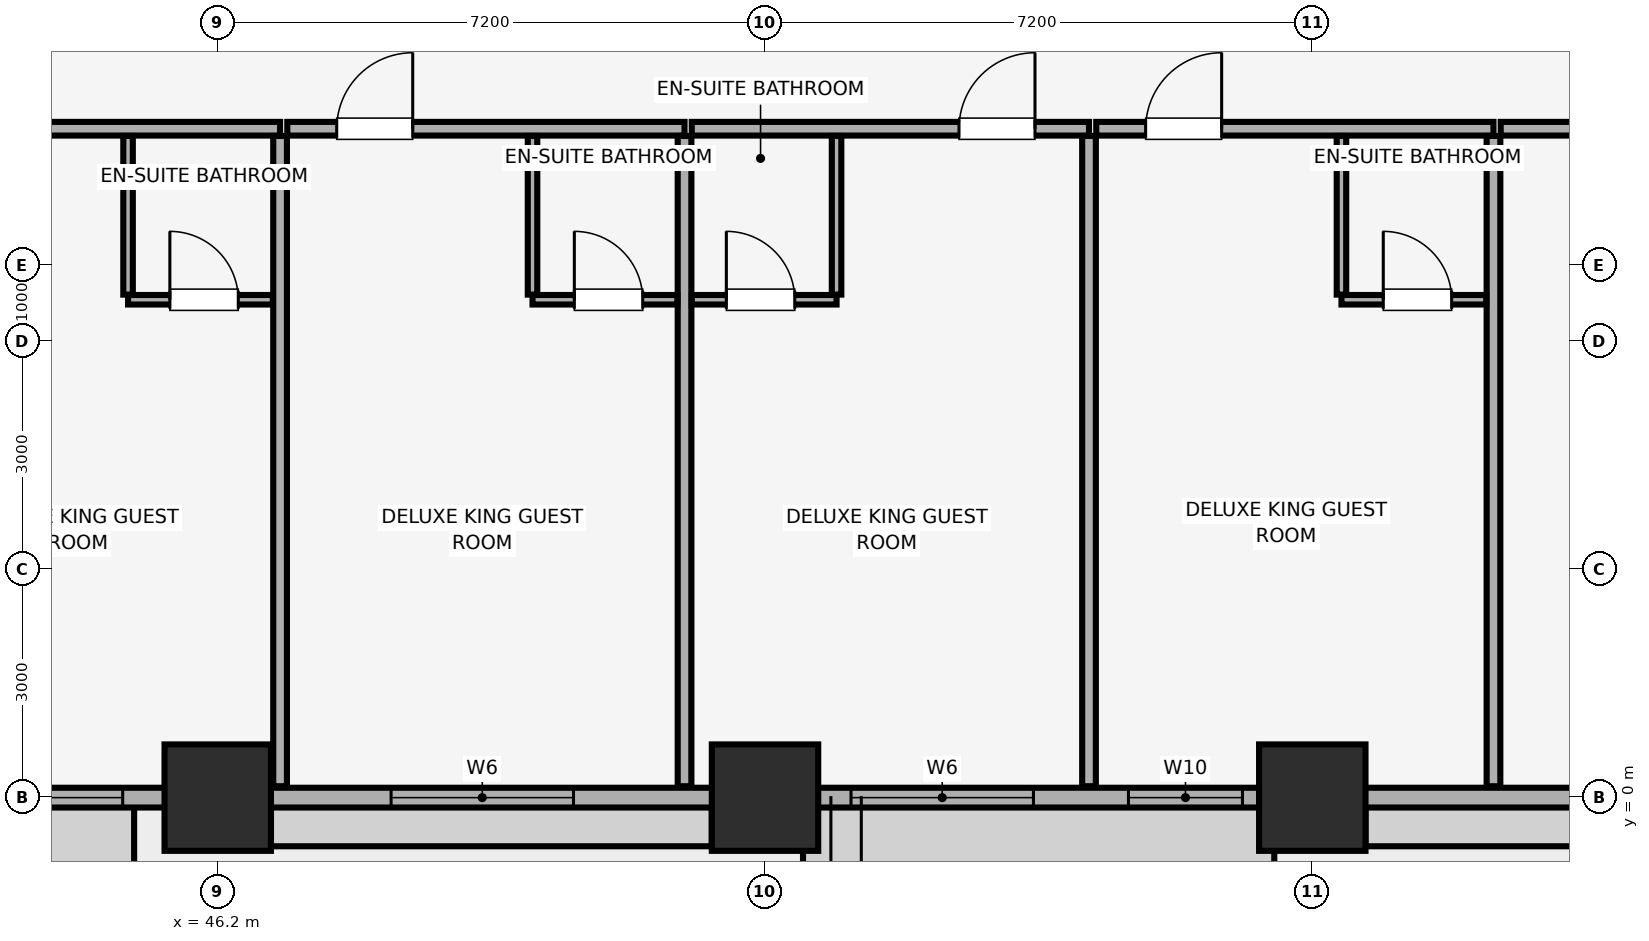
"""IFC4 building model, lengths in metres.
Left out: names, types, materials, properties, quantities, classifications, styles, units other than length and angle.
Written with IfcOpenShell. Run it as: python <this file> out.ifc"""

import sys

from ifc_helpers import new_model, si_unit, direction, frame, frame_2d, origin, origin_2d, place, context, subcontext, project, spatial, rectangle, extrude, element, fill, save


model = new_model("IFC4")
c1 = context("Model", 3, precision=1e-05, world=origin(), true_north=direction((0.0, 1.0)))
c2 = subcontext(c1, "Body", "Model", "MODEL_VIEW")
j1 = project(units=[si_unit("LENGTHUNIT", "METRE"), si_unit("PLANEANGLEUNIT", "RADIAN")], contexts=[c1])
p1 = place(None, origin())
s1 = spatial("IfcSite", under=j1, at=p1, CompositionType="ELEMENT")
p2 = place(p1, origin())
s2 = spatial("IfcBuilding", under=s1, at=p2, CompositionType="ELEMENT")
p3 = place(p2, frame((0.0, 0.0, 35.15)))
s3 = spatial("IfcBuildingStorey", under=s2, at=p3, CompositionType="ELEMENT", Elevation=35.15)
for number, where, z_axis, x_axis in (
    (1, (46.2, 0.0, 0.0), (0.0, 0.0, 1.0), (1.0, 0.0, 0.0)),
    (2, (53.4, 0.0, 0.0), (0.0, 0.0, 1.0), (1.0, 0.0, 0.0)),
    (3, (60.6, 0.0, 0.0), (0.0, 0.0, 1.0), (1.0, 0.0, 0.0)),
):
    element("IfcColumn", number, at=place(p3, frame(where, z_axis=z_axis, x_axis=x_axis)), inside=s3, PredefinedType="COLUMN", context=c2, shape_type="SweptSolid", body=[
        extrude(rectangle(XDim=1.4, YDim=1.4, at=origin_2d()), origin(), (0.0, 0.0, 1.0), 3.51),
    ])
p4 = place(p3, frame((4.2, 0.0, 0.0), z_axis=(0.0, 0.0, 1.0), x_axis=(1.0, 0.0, 0.0)))
e4 = element("IfcWall", 4, at=p4, inside=s3, PredefinedType="SOLIDWALL", context=c2, shape_type="SweptSolid", body=[
    extrude(rectangle(XDim=75.6, YDim=0.26, at=frame_2d((37.8, 0.0))), origin(), (0.0, 0.0, 1.0), 2.56),
])
p5 = place(p4, frame((13.517, 0.0, 0.0)))
e5 = element("IfcOpeningElement", 5, at=p5, cuts=e4, PredefinedType="OPENING", context=c2, shape_type="SweptSolid", body=[
    extrude(rectangle(XDim=1.1, YDim=2.15, at=frame_2d((0.55, 1.075))), frame((0.0, 0.14, 0.0), z_axis=(0.0, -1.0, 0.0), x_axis=(1.0, 0.0, 0.0)), (0.0, 0.0, 1.0), 0.28),
])
p6 = place(p4, frame((28.183, 0.0, 0.0)))
e6 = element("IfcOpeningElement", 6, at=p6, cuts=e4, PredefinedType="OPENING", context=c2, shape_type="SweptSolid", body=[
    extrude(rectangle(XDim=1.1, YDim=2.15, at=frame_2d((0.55, 1.075))), frame((0.0, 0.14, 0.0), z_axis=(0.0, -1.0, 0.0), x_axis=(1.0, 0.0, 0.0)), (0.0, 0.0, 1.0), 0.28),
])
p7 = place(p4, frame((60.983, 0.0, 0.0)))
e7 = element("IfcOpeningElement", 7, at=p7, cuts=e4, PredefinedType="OPENING", context=c2, shape_type="SweptSolid", body=[
    extrude(rectangle(XDim=1.1, YDim=2.15, at=frame_2d((0.55, 1.075))), frame((0.0, 0.14, 0.0), z_axis=(0.0, -1.0, 0.0), x_axis=(1.0, 0.0, 0.0)), (0.0, 0.0, 1.0), 0.28),
])
p8 = place(p4, frame((1.035, 0.0, 0.85)))
e8 = element("IfcOpeningElement", 8, at=p8, cuts=e4, PredefinedType="OPENING", context=c2, shape_type="SweptSolid", body=[
    extrude(rectangle(XDim=2.4, YDim=1.5, at=frame_2d((1.2, 0.75))), frame((0.0, 0.14, 0.0), z_axis=(0.0, -1.0, 0.0), x_axis=(1.0, 0.0, 0.0)), (0.0, 0.0, 1.0), 0.28),
])
p9 = place(p4, frame((7.031, 0.0, 0.85)))
e9 = element("IfcOpeningElement", 9, at=p9, cuts=e4, PredefinedType="OPENING", context=c2, shape_type="SweptSolid", body=[
    extrude(rectangle(XDim=2.4, YDim=1.5, at=frame_2d((1.2, 0.75))), frame((0.0, 0.14, 0.0), z_axis=(0.0, -1.0, 0.0), x_axis=(1.0, 0.0, 0.0)), (0.0, 0.0, 1.0), 0.28),
])
p10 = place(p4, frame((16.757, 0.0, 0.85)))
e10 = element("IfcOpeningElement", 10, at=p10, cuts=e4, PredefinedType="OPENING", context=c2, shape_type="SweptSolid", body=[
    extrude(rectangle(XDim=1.5, YDim=1.4, at=frame_2d((0.75, 0.7))), frame((0.0, 0.14, 0.0), z_axis=(0.0, -1.0, 0.0), x_axis=(1.0, 0.0, 0.0)), (0.0, 0.0, 1.0), 0.28),
])
p11 = place(p4, frame((22.567, 0.0, 0.85)))
e11 = element("IfcOpeningElement", 11, at=p11, cuts=e4, PredefinedType="OPENING", context=c2, shape_type="SweptSolid", body=[
    extrude(rectangle(XDim=2.4, YDim=1.5, at=frame_2d((1.2, 0.75))), frame((0.0, 0.14, 0.0), z_axis=(0.0, -1.0, 0.0), x_axis=(1.0, 0.0, 0.0)), (0.0, 0.0, 1.0), 0.28),
])
p12 = place(p4, frame((30.065, 0.0, 0.85)))
e12 = element("IfcOpeningElement", 12, at=p12, cuts=e4, PredefinedType="OPENING", context=c2, shape_type="SweptSolid", body=[
    extrude(rectangle(XDim=1.5, YDim=1.4, at=frame_2d((0.75, 0.7))), frame((0.0, 0.14, 0.0), z_axis=(0.0, -1.0, 0.0), x_axis=(1.0, 0.0, 0.0)), (0.0, 0.0, 1.0), 0.28),
])
p13 = place(p4, frame((34.55, 0.0, 0.85)))
e13 = element("IfcOpeningElement", 13, at=p13, cuts=e4, PredefinedType="OPENING", context=c2, shape_type="SweptSolid", body=[
    extrude(rectangle(XDim=2.4, YDim=1.5, at=frame_2d((1.2, 0.75))), frame((0.0, 0.14, 0.0), z_axis=(0.0, -1.0, 0.0), x_axis=(1.0, 0.0, 0.0)), (0.0, 0.0, 1.0), 0.28),
])
p14 = place(p4, frame((38.35, 0.0, 0.85)))
e14 = element("IfcOpeningElement", 14, at=p14, cuts=e4, PredefinedType="OPENING", context=c2, shape_type="SweptSolid", body=[
    extrude(rectangle(XDim=2.4, YDim=1.5, at=frame_2d((1.2, 0.75))), frame((0.0, 0.14, 0.0), z_axis=(0.0, -1.0, 0.0), x_axis=(1.0, 0.0, 0.0)), (0.0, 0.0, 1.0), 0.28),
])
p15 = place(p4, frame((44.281, 0.0, 0.85)))
e15 = element("IfcOpeningElement", 15, at=p15, cuts=e4, PredefinedType="OPENING", context=c2, shape_type="SweptSolid", body=[
    extrude(rectangle(XDim=2.4, YDim=1.5, at=frame_2d((1.2, 0.75))), frame((0.0, 0.14, 0.0), z_axis=(0.0, -1.0, 0.0), x_axis=(1.0, 0.0, 0.0)), (0.0, 0.0, 1.0), 0.28),
])
p16 = place(p4, frame((50.332, 0.0, 0.85)))
e16 = element("IfcOpeningElement", 16, at=p16, cuts=e4, PredefinedType="OPENING", context=c2, shape_type="SweptSolid", body=[
    extrude(rectangle(XDim=2.4, YDim=1.5, at=frame_2d((1.2, 0.75))), frame((0.0, 0.14, 0.0), z_axis=(0.0, -1.0, 0.0), x_axis=(1.0, 0.0, 0.0)), (0.0, 0.0, 1.0), 0.28),
])
p17 = place(p4, frame((53.981, 0.0, 0.85)))
e17 = element("IfcOpeningElement", 17, at=p17, cuts=e4, PredefinedType="OPENING", context=c2, shape_type="SweptSolid", body=[
    extrude(rectangle(XDim=1.5, YDim=1.4, at=frame_2d((0.75, 0.7))), frame((0.0, 0.14, 0.0), z_axis=(0.0, -1.0, 0.0), x_axis=(1.0, 0.0, 0.0)), (0.0, 0.0, 1.0), 0.28),
])
p18 = place(p4, frame((64.759, 0.0, 0.85)))
e18 = element("IfcOpeningElement", 18, at=p18, cuts=e4, PredefinedType="OPENING", context=c2, shape_type="SweptSolid", body=[
    extrude(rectangle(XDim=1.5, YDim=1.4, at=frame_2d((0.75, 0.7))), frame((0.0, 0.14, 0.0), z_axis=(0.0, -1.0, 0.0), x_axis=(1.0, 0.0, 0.0)), (0.0, 0.0, 1.0), 0.28),
])
p19 = place(p4, frame((67.509, 0.0, 0.85)))
e19 = element("IfcOpeningElement", 19, at=p19, cuts=e4, PredefinedType="OPENING", context=c2, shape_type="SweptSolid", body=[
    extrude(rectangle(XDim=2.4, YDim=1.5, at=frame_2d((1.2, 0.75))), frame((0.0, 0.14, 0.0), z_axis=(0.0, -1.0, 0.0), x_axis=(1.0, 0.0, 0.0)), (0.0, 0.0, 1.0), 0.28),
])
p20 = place(p4, frame((72.165, 0.0, 0.85)))
e20 = element("IfcOpeningElement", 20, at=p20, cuts=e4, PredefinedType="OPENING", context=c2, shape_type="SweptSolid", body=[
    extrude(rectangle(XDim=2.4, YDim=1.5, at=frame_2d((1.2, 0.75))), frame((0.0, 0.14, 0.0), z_axis=(0.0, -1.0, 0.0), x_axis=(1.0, 0.0, 0.0)), (0.0, 0.0, 1.0), 0.28),
])
p21 = place(p3, frame((41.794, 8.8, 0.0), z_axis=(0.0, 0.0, 1.0), x_axis=(1.0, 0.0, 0.0)))
e21 = element("IfcWall", 21, at=p21, inside=s3, PredefinedType="PARTITIONING", context=c2, shape_type="SweptSolid", body=[
    extrude(rectangle(XDim=5.226, YDim=0.18, at=frame_2d((2.613, 0.0))), origin(), (0.0, 0.0, 1.0), 3.51),
])
p22 = place(p21, frame((0.65, 0.0, 0.0)))
e22 = element("IfcOpeningElement", 22, at=p22, cuts=e21, PredefinedType="OPENING", context=c2, shape_type="SweptSolid", body=[
    extrude(rectangle(XDim=1.0, YDim=2.15, at=frame_2d((0.5, 1.075))), frame((0.0, 0.1, 0.0), z_axis=(0.0, -1.0, 0.0), x_axis=(1.0, 0.0, 0.0)), (0.0, 0.0, 1.0), 0.2),
])
p23 = place(p3, frame((47.02, 0.15, 0.0), z_axis=(0.0, 0.0, 1.0), x_axis=(0.0, 1.0, 0.0)))
e23 = element("IfcWall", 23, at=p23, inside=s3, PredefinedType="PARTITIONING", context=c2, shape_type="SweptSolid", body=[
    extrude(rectangle(XDim=8.555, YDim=0.18, at=frame_2d((4.278, 0.0))), origin(), (0.0, 0.0, 1.0), 3.51),
])
p24 = place(p3, frame((45.02, 6.55, 0.0), z_axis=(0.0, 0.0, 1.0), x_axis=(1.0, 0.0, 0.0)))
e24 = element("IfcWall", 24, at=p24, inside=s3, PredefinedType="PARTITIONING", context=c2, shape_type="SweptSolid", body=[
    extrude(rectangle(XDim=1.905, YDim=0.125, at=frame_2d((0.953, 0.0))), origin(), (0.0, 0.0, 1.0), 3.51),
])
p25 = place(p24, frame((0.55, 0.0, 0.0)))
e25 = element("IfcOpeningElement", 25, at=p25, cuts=e24, PredefinedType="OPENING", context=c2, shape_type="SweptSolid", body=[
    extrude(rectangle(XDim=0.9, YDim=2.1, at=frame_2d((0.45, 1.05))), frame((0.0, 0.073, 0.0), z_axis=(0.0, -1.0, 0.0), x_axis=(1.0, 0.0, 0.0)), (0.0, 0.0, 1.0), 0.145),
])
p26 = place(p3, frame((45.02, 6.617, 0.0), z_axis=(0.0, 0.0, 1.0), x_axis=(0.0, 1.0, 0.0)))
e26 = element("IfcWall", 26, at=p26, inside=s3, PredefinedType="PARTITIONING", context=c2, shape_type="SweptSolid", body=[
    extrude(rectangle(XDim=2.088, YDim=0.125, at=frame_2d((1.044, 0.0))), origin(), (0.0, 0.0, 1.0), 3.51),
])
p27 = place(p3, frame((47.115, 8.8, 0.0), z_axis=(0.0, 0.0, 1.0), x_axis=(1.0, 0.0, 0.0)))
e27 = element("IfcWall", 27, at=p27, inside=s3, PredefinedType="PARTITIONING", context=c2, shape_type="SweptSolid", body=[
    extrude(rectangle(XDim=5.226, YDim=0.18, at=frame_2d((2.613, 0.0))), origin(), (0.0, 0.0, 1.0), 3.51),
])
p28 = place(p27, frame((0.65, 0.0, 0.0)))
e28 = element("IfcOpeningElement", 28, at=p28, cuts=e27, PredefinedType="OPENING", context=c2, shape_type="SweptSolid", body=[
    extrude(rectangle(XDim=1.0, YDim=2.15, at=frame_2d((0.5, 1.075))), frame((0.0, 0.1, 0.0), z_axis=(0.0, -1.0, 0.0), x_axis=(1.0, 0.0, 0.0)), (0.0, 0.0, 1.0), 0.2),
])
p29 = place(p3, frame((52.341, 0.15, 0.0), z_axis=(0.0, 0.0, 1.0), x_axis=(0.0, 1.0, 0.0)))
e29 = element("IfcWall", 29, at=p29, inside=s3, PredefinedType="PARTITIONING", context=c2, shape_type="SweptSolid", body=[
    extrude(rectangle(XDim=8.555, YDim=0.18, at=frame_2d((4.278, 0.0))), origin(), (0.0, 0.0, 1.0), 3.51),
])
p30 = place(p3, frame((50.341, 6.55, 0.0), z_axis=(0.0, 0.0, 1.0), x_axis=(1.0, 0.0, 0.0)))
e30 = element("IfcWall", 30, at=p30, inside=s3, PredefinedType="PARTITIONING", context=c2, shape_type="SweptSolid", body=[
    extrude(rectangle(XDim=1.905, YDim=0.125, at=frame_2d((0.953, 0.0))), origin(), (0.0, 0.0, 1.0), 3.51),
])
p31 = place(p30, frame((0.55, 0.0, 0.0)))
e31 = element("IfcOpeningElement", 31, at=p31, cuts=e30, PredefinedType="OPENING", context=c2, shape_type="SweptSolid", body=[
    extrude(rectangle(XDim=0.9, YDim=2.1, at=frame_2d((0.45, 1.05))), frame((0.0, 0.073, 0.0), z_axis=(0.0, -1.0, 0.0), x_axis=(1.0, 0.0, 0.0)), (0.0, 0.0, 1.0), 0.145),
])
p32 = place(p3, frame((50.341, 6.617, 0.0), z_axis=(0.0, 0.0, 1.0), x_axis=(0.0, 1.0, 0.0)))
e32 = element("IfcWall", 32, at=p32, inside=s3, PredefinedType="PARTITIONING", context=c2, shape_type="SweptSolid", body=[
    extrude(rectangle(XDim=2.088, YDim=0.125, at=frame_2d((1.044, 0.0))), origin(), (0.0, 0.0, 1.0), 3.51),
])
p33 = place(p3, frame((52.436, 8.8, 0.0), z_axis=(0.0, 0.0, 1.0), x_axis=(1.0, 0.0, 0.0)))
e33 = element("IfcWall", 33, at=p33, inside=s3, PredefinedType="PARTITIONING", context=c2, shape_type="SweptSolid", body=[
    extrude(rectangle(XDim=5.226, YDim=0.18, at=frame_2d((2.613, 0.0))), origin(), (0.0, 0.0, 1.0), 3.51),
])
p34 = place(p33, frame((3.516, 0.0, 0.0)))
e34 = element("IfcOpeningElement", 34, at=p34, cuts=e33, PredefinedType="OPENING", context=c2, shape_type="SweptSolid", body=[
    extrude(rectangle(XDim=1.0, YDim=2.15, at=frame_2d((0.5, 1.075))), frame((0.0, 0.1, 0.0), z_axis=(0.0, -1.0, 0.0), x_axis=(1.0, 0.0, 0.0)), (0.0, 0.0, 1.0), 0.2),
])
p35 = place(p3, frame((57.663, 0.15, 0.0), z_axis=(0.0, 0.0, 1.0), x_axis=(0.0, 1.0, 0.0)))
e35 = element("IfcWall", 35, at=p35, inside=s3, PredefinedType="PARTITIONING", context=c2, shape_type="SweptSolid", body=[
    extrude(rectangle(XDim=8.555, YDim=0.18, at=frame_2d((4.278, 0.0))), origin(), (0.0, 0.0, 1.0), 3.51),
])
p36 = place(p3, frame((52.436, 6.55, 0.0), z_axis=(0.0, 0.0, 1.0), x_axis=(1.0, 0.0, 0.0)))
e36 = element("IfcWall", 36, at=p36, inside=s3, PredefinedType="PARTITIONING", context=c2, shape_type="SweptSolid", body=[
    extrude(rectangle(XDim=1.905, YDim=0.125, at=frame_2d((0.953, 0.0))), origin(), (0.0, 0.0, 1.0), 3.51),
])
p37 = place(p36, frame((0.455, 0.0, 0.0)))
e37 = element("IfcOpeningElement", 37, at=p37, cuts=e36, PredefinedType="OPENING", context=c2, shape_type="SweptSolid", body=[
    extrude(rectangle(XDim=0.9, YDim=2.1, at=frame_2d((0.45, 1.05))), frame((0.0, 0.073, 0.0), z_axis=(0.0, -1.0, 0.0), x_axis=(1.0, 0.0, 0.0)), (0.0, 0.0, 1.0), 0.145),
])
p38 = place(p3, frame((54.341, 6.617, 0.0), z_axis=(0.0, 0.0, 1.0), x_axis=(0.0, 1.0, 0.0)))
e38 = element("IfcWall", 38, at=p38, inside=s3, PredefinedType="PARTITIONING", context=c2, shape_type="SweptSolid", body=[
    extrude(rectangle(XDim=2.088, YDim=0.125, at=frame_2d((1.044, 0.0))), origin(), (0.0, 0.0, 1.0), 3.51),
])
p39 = place(p3, frame((57.758, 8.8, 0.0), z_axis=(0.0, 0.0, 1.0), x_axis=(1.0, 0.0, 0.0)))
e39 = element("IfcWall", 39, at=p39, inside=s3, PredefinedType="PARTITIONING", context=c2, shape_type="SweptSolid", body=[
    extrude(rectangle(XDim=5.226, YDim=0.18, at=frame_2d((2.613, 0.0))), origin(), (0.0, 0.0, 1.0), 3.51),
])
p40 = place(p39, frame((0.65, 0.0, 0.0)))
e40 = element("IfcOpeningElement", 40, at=p40, cuts=e39, PredefinedType="OPENING", context=c2, shape_type="SweptSolid", body=[
    extrude(rectangle(XDim=1.0, YDim=2.15, at=frame_2d((0.5, 1.075))), frame((0.0, 0.1, 0.0), z_axis=(0.0, -1.0, 0.0), x_axis=(1.0, 0.0, 0.0)), (0.0, 0.0, 1.0), 0.2),
])
p41 = place(p3, frame((62.984, 0.15, 0.0), z_axis=(0.0, 0.0, 1.0), x_axis=(0.0, 1.0, 0.0)))
e41 = element("IfcWall", 41, at=p41, inside=s3, PredefinedType="PARTITIONING", context=c2, shape_type="SweptSolid", body=[
    extrude(rectangle(XDim=8.555, YDim=0.18, at=frame_2d((4.278, 0.0))), origin(), (0.0, 0.0, 1.0), 3.51),
])
p42 = place(p3, frame((60.984, 6.55, 0.0), z_axis=(0.0, 0.0, 1.0), x_axis=(1.0, 0.0, 0.0)))
e42 = element("IfcWall", 42, at=p42, inside=s3, PredefinedType="PARTITIONING", context=c2, shape_type="SweptSolid", body=[
    extrude(rectangle(XDim=1.905, YDim=0.125, at=frame_2d((0.953, 0.0))), origin(), (0.0, 0.0, 1.0), 3.51),
])
p43 = place(p42, frame((0.55, 0.0, 0.0)))
e43 = element("IfcOpeningElement", 43, at=p43, cuts=e42, PredefinedType="OPENING", context=c2, shape_type="SweptSolid", body=[
    extrude(rectangle(XDim=0.9, YDim=2.1, at=frame_2d((0.45, 1.05))), frame((0.0, 0.073, 0.0), z_axis=(0.0, -1.0, 0.0), x_axis=(1.0, 0.0, 0.0)), (0.0, 0.0, 1.0), 0.145),
])
p44 = place(p3, frame((60.984, 6.617, 0.0), z_axis=(0.0, 0.0, 1.0), x_axis=(0.0, 1.0, 0.0)))
e44 = element("IfcWall", 44, at=p44, inside=s3, PredefinedType="PARTITIONING", context=c2, shape_type="SweptSolid", body=[
    extrude(rectangle(XDim=2.088, YDim=0.125, at=frame_2d((1.044, 0.0))), origin(), (0.0, 0.0, 1.0), 3.51),
])
p45 = place(p3, frame((63.079, 8.8, 0.0), z_axis=(0.0, 0.0, 1.0), x_axis=(1.0, 0.0, 0.0)))
e45 = element("IfcWall", 45, at=p45, inside=s3, PredefinedType="PARTITIONING", context=c2, shape_type="SweptSolid", body=[
    extrude(rectangle(XDim=8.138, YDim=0.18, at=frame_2d((4.069, 0.0))), origin(), (0.0, 0.0, 1.0), 3.51),
])
p46 = place(p45, frame((1.423, 0.0, 0.0)))
e46 = element("IfcOpeningElement", 46, at=p46, cuts=e45, PredefinedType="OPENING", context=c2, shape_type="SweptSolid", body=[
    extrude(rectangle(XDim=1.0, YDim=2.15, at=frame_2d((0.5, 1.075))), frame((0.0, 0.1, 0.0), z_axis=(0.0, -1.0, 0.0), x_axis=(1.0, 0.0, 0.0)), (0.0, 0.0, 1.0), 0.2),
])
p47 = place(p14, origin())
e47 = element("IfcWindow", 47, at=p47, inside=s3, PartitioningType="SINGLE_PANEL", PredefinedType="WINDOW", context=c2, shape_type="SweptSolid", body=[
    extrude(rectangle(XDim=2.4, YDim=1.5, at=frame_2d((1.2, 0.75))), frame((0.0, 0.03, 0.0), z_axis=(0.0, -1.0, 0.0), x_axis=(1.0, 0.0, 0.0)), (0.0, 0.0, 1.0), 0.06),
])
fill(e14, e47)
p48 = place(p15, origin())
e48 = element("IfcWindow", 48, at=p48, inside=s3, PartitioningType="SINGLE_PANEL", PredefinedType="WINDOW", context=c2, shape_type="SweptSolid", body=[
    extrude(rectangle(XDim=2.4, YDim=1.5, at=frame_2d((1.2, 0.75))), frame((0.0, 0.03, 0.0), z_axis=(0.0, -1.0, 0.0), x_axis=(1.0, 0.0, 0.0)), (0.0, 0.0, 1.0), 0.06),
])
fill(e15, e48)
p49 = place(p16, origin())
e49 = element("IfcWindow", 49, at=p49, inside=s3, PartitioningType="SINGLE_PANEL", PredefinedType="WINDOW", context=c2, shape_type="SweptSolid", body=[
    extrude(rectangle(XDim=2.4, YDim=1.5, at=frame_2d((1.2, 0.75))), frame((0.0, 0.03, 0.0), z_axis=(0.0, -1.0, 0.0), x_axis=(1.0, 0.0, 0.0)), (0.0, 0.0, 1.0), 0.06),
])
fill(e16, e49)
p50 = place(p17, origin())
e50 = element("IfcWindow", 50, at=p50, inside=s3, PartitioningType="SINGLE_PANEL", PredefinedType="WINDOW", context=c2, shape_type="SweptSolid", body=[
    extrude(rectangle(XDim=1.5, YDim=1.4, at=frame_2d((0.75, 0.7))), frame((0.0, 0.03, 0.0), z_axis=(0.0, -1.0, 0.0), x_axis=(1.0, 0.0, 0.0)), (0.0, 0.0, 1.0), 0.06),
])
fill(e17, e50)
p51 = place(p25, origin())
e51 = element("IfcDoor", 51, at=p51, inside=s3, OperationType="SINGLE_SWING_LEFT", PredefinedType="DOOR", context=c2, shape_type="SweptSolid", body=[
    extrude(rectangle(XDim=0.9, YDim=2.1, at=frame_2d((0.45, 1.05))), frame((0.0, 0.025, 0.0), z_axis=(0.0, -1.0, 0.0), x_axis=(1.0, 0.0, 0.0)), (0.0, 0.0, 1.0), 0.05),
])
fill(e25, e51)
p52 = place(p28, origin())
e52 = element("IfcDoor", 52, at=p52, inside=s3, OperationType="SINGLE_SWING_RIGHT", PredefinedType="DOOR", context=c2, shape_type="SweptSolid", body=[
    extrude(rectangle(XDim=1.0, YDim=2.15, at=frame_2d((0.5, 1.075))), frame((0.0, 0.025, 0.0), z_axis=(0.0, -1.0, 0.0), x_axis=(1.0, 0.0, 0.0)), (0.0, 0.0, 1.0), 0.05),
])
fill(e28, e52)
p53 = place(p31, origin())
e53 = element("IfcDoor", 53, at=p53, inside=s3, OperationType="SINGLE_SWING_LEFT", PredefinedType="DOOR", context=c2, shape_type="SweptSolid", body=[
    extrude(rectangle(XDim=0.9, YDim=2.1, at=frame_2d((0.45, 1.05))), frame((0.0, 0.025, 0.0), z_axis=(0.0, -1.0, 0.0), x_axis=(1.0, 0.0, 0.0)), (0.0, 0.0, 1.0), 0.05),
])
fill(e31, e53)
p54 = place(p34, origin())
e54 = element("IfcDoor", 54, at=p54, inside=s3, OperationType="SINGLE_SWING_RIGHT", PredefinedType="DOOR", context=c2, shape_type="SweptSolid", body=[
    extrude(rectangle(XDim=1.0, YDim=2.15, at=frame_2d((0.5, 1.075))), frame((0.0, 0.025, 0.0), z_axis=(0.0, -1.0, 0.0), x_axis=(1.0, 0.0, 0.0)), (0.0, 0.0, 1.0), 0.05),
])
fill(e34, e54)
p55 = place(p37, origin())
e55 = element("IfcDoor", 55, at=p55, inside=s3, OperationType="SINGLE_SWING_LEFT", PredefinedType="DOOR", context=c2, shape_type="SweptSolid", body=[
    extrude(rectangle(XDim=0.9, YDim=2.1, at=frame_2d((0.45, 1.05))), frame((0.0, 0.025, 0.0), z_axis=(0.0, -1.0, 0.0), x_axis=(1.0, 0.0, 0.0)), (0.0, 0.0, 1.0), 0.05),
])
fill(e37, e55)
p56 = place(p40, origin())
e56 = element("IfcDoor", 56, at=p56, inside=s3, OperationType="SINGLE_SWING_RIGHT", PredefinedType="DOOR", context=c2, shape_type="SweptSolid", body=[
    extrude(rectangle(XDim=1.0, YDim=2.15, at=frame_2d((0.5, 1.075))), frame((0.0, 0.025, 0.0), z_axis=(0.0, -1.0, 0.0), x_axis=(1.0, 0.0, 0.0)), (0.0, 0.0, 1.0), 0.05),
])
fill(e40, e56)
p57 = place(p43, origin())
e57 = element("IfcDoor", 57, at=p57, inside=s3, OperationType="SINGLE_SWING_LEFT", PredefinedType="DOOR", context=c2, shape_type="SweptSolid", body=[
    extrude(rectangle(XDim=0.9, YDim=2.1, at=frame_2d((0.45, 1.05))), frame((0.0, 0.025, 0.0), z_axis=(0.0, -1.0, 0.0), x_axis=(1.0, 0.0, 0.0)), (0.0, 0.0, 1.0), 0.05),
])
fill(e43, e57)
save(model, sys.argv[1])
